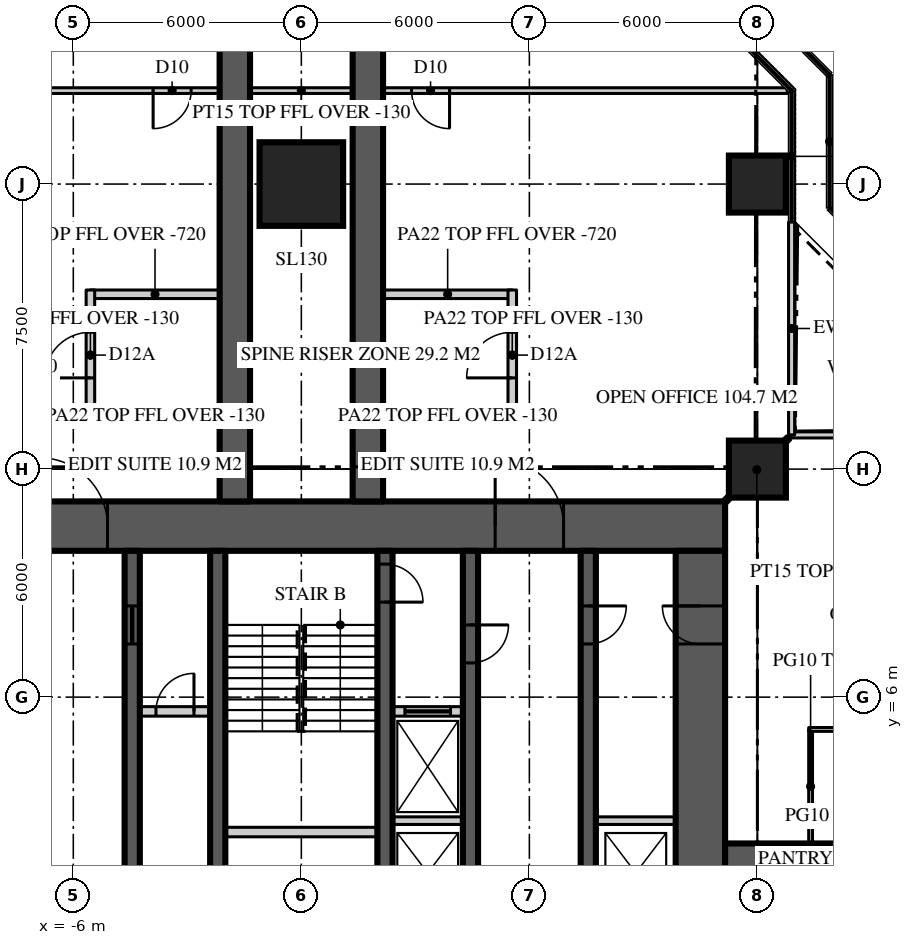
"""IFC4 building model, lengths in metres.
Left out: names, types, materials, properties, quantities, classifications, styles, units other than length and angle.
Written with IfcOpenShell. Run it as: python <this file> out.ifc"""

import sys

from ifc_helpers import new_model, si_unit, direction, frame, frame_2d, origin, origin_2d, place, context, subcontext, project, spatial, rectangle, extrude, element, fill, save


model = new_model("IFC4")
c1 = context("Model", 3, precision=1e-05, world=origin(), true_north=direction((0.0, 1.0)))
c2 = subcontext(c1, "Body", "Model", "MODEL_VIEW")
j1 = project(units=[si_unit("LENGTHUNIT", "METRE"), si_unit("PLANEANGLEUNIT", "RADIAN")], contexts=[c1])
p1 = place(None, origin())
s1 = spatial("IfcSite", under=j1, at=p1, CompositionType="ELEMENT")
p2 = place(p1, origin())
s2 = spatial("IfcBuilding", under=s1, at=p2, CompositionType="ELEMENT")
p3 = place(p2, frame((0.0, 0.0, 236.1)))
s3 = spatial("IfcBuildingStorey", under=s2, at=p3, CompositionType="ELEMENT", Elevation=236.1)
p4 = place(p3, frame((-11.15, 10.5, 0.0), z_axis=(0.0, 0.0, 1.0), x_axis=(1.0, 0.0, 0.0)))
e1 = element("IfcWall", 1, at=p4, inside=s3, PredefinedType="SHEAR", context=c2, shape_type="SweptSolid", body=[
    extrude(rectangle(XDim=22.3, YDim=1.3, at=frame_2d((11.15, 0.0))), origin(), (0.0, 0.0, 1.0), 3.9),
])
p5 = place(p4, frame((4.25, 0.0, 0.0)))
e2 = element("IfcOpeningElement", 2, at=p5, cuts=e1, PredefinedType="OPENING", context=c2, shape_type="SweptSolid", body=[
    extrude(rectangle(XDim=1.8, YDim=2.2, at=frame_2d((0.9, 1.1))), frame((0.0, 0.66, 0.0), z_axis=(0.0, -1.0, 0.0), x_axis=(1.0, 0.0, 0.0)), (0.0, 0.0, 1.0), 1.32),
])
p6 = place(p4, frame((16.25, 0.0, 0.0)))
e3 = element("IfcOpeningElement", 3, at=p6, cuts=e1, PredefinedType="OPENING", context=c2, shape_type="SweptSolid", body=[
    extrude(rectangle(XDim=1.8, YDim=2.2, at=frame_2d((0.9, 1.1))), frame((0.0, 0.66, 0.0), z_axis=(0.0, -1.0, 0.0), x_axis=(1.0, 0.0, 0.0)), (0.0, 0.0, 1.0), 1.32),
])
p7 = place(p3, frame((10.5, -9.85, 0.0), z_axis=(0.0, 0.0, 1.0), x_axis=(0.0, 1.0, 0.0)))
e4 = element("IfcWall", 4, at=p7, inside=s3, PredefinedType="SHEAR", context=c2, shape_type="SweptSolid", body=[
    extrude(rectangle(XDim=19.7, YDim=1.3, at=frame_2d((9.85, 0.0))), origin(), (0.0, 0.0, 1.0), 3.9),
])
p8 = place(p7, frame((17.25, 0.0, 0.0)))
e5 = element("IfcOpeningElement", 5, at=p8, cuts=e4, PredefinedType="OPENING", context=c2, shape_type="SweptSolid", body=[
    extrude(rectangle(XDim=1.0, YDim=2.2, at=frame_2d((0.5, 1.1))), frame((0.0, 0.66, 0.0), z_axis=(0.0, -1.0, 0.0), x_axis=(1.0, 0.0, 0.0)), (0.0, 0.0, 1.0), 1.32),
])
for number, where, z_axis, x_axis in (
    (6, (11.15, 1.75, 0.0), (0.0, 0.0, 1.0), (1.0, 0.0, 0.0)),
    (7, (1.75, 11.15, 0.0), (0.0, 0.0, 1.0), (0.0, 1.0, 0.0)),
    (8, (-1.75, 11.15, 0.0), (0.0, 0.0, 1.0), (0.0, 1.0, 0.0)),
):
    element("IfcWall", number, at=place(p3, frame(where, z_axis=z_axis, x_axis=x_axis)), inside=s3, PredefinedType="SHEAR", context=c2, shape_type="SweptSolid", body=[
        extrude(rectangle(XDim=15.25, YDim=0.8, at=frame_2d((7.625, 0.0))), origin(), (0.0, 0.0, 1.0), 3.9),
    ])
p9 = place(p3, frame((12.0, 12.0, 0.0), z_axis=(0.0, 0.0, 1.0), x_axis=(1.0, 0.0, 0.0)))
e9 = element("IfcColumn", 9, at=p9, inside=s3, PredefinedType="COLUMN", context=c2, shape_type="SweptSolid", body=[
    extrude(rectangle(XDim=1.5, YDim=1.5, at=origin_2d()), origin(), (0.0, 0.0, 1.0), 3.9),
])
p10 = place(p3, frame((0.0, 19.5, 0.0), z_axis=(0.0, 0.0, 1.0), x_axis=(1.0, 0.0, 0.0)))
e10 = element("IfcColumn", 10, at=p10, inside=s3, PredefinedType="COLUMN", context=c2, shape_type="SweptSolid", body=[
    extrude(rectangle(XDim=2.2, YDim=2.2, at=origin_2d()), origin(), (0.0, 0.0, 1.0), 3.9),
])
p11 = place(p3, frame((12.0, 19.5, 0.0), z_axis=(0.0, 0.0, 1.0), x_axis=(1.0, 0.0, 0.0)))
e11 = element("IfcColumn", 11, at=p11, inside=s3, PredefinedType="COLUMN", context=c2, shape_type="SweptSolid", body=[
    extrude(rectangle(XDim=1.5, YDim=1.5, at=origin_2d()), origin(), (0.0, 0.0, 1.0), 3.9),
])
p12 = place(p3, frame((18.5, 12.9, 0.0), z_axis=(0.0, 0.0, 1.0), x_axis=(-1.0, 0.0, 0.0)))
e12 = element("IfcWall", 12, at=p12, inside=s3, PredefinedType="SOLIDWALL", context=c2, shape_type="SweptSolid", body=[
    extrude(rectangle(XDim=5.6, YDim=0.16, at=frame_2d((2.8, 0.0))), origin(), (0.0, 0.0, 1.0), 3.77),
])
p13 = place(p12, frame((2.3, 0.0, 0.0)))
e13 = element("IfcOpeningElement", 13, at=p13, cuts=e12, PredefinedType="OPENING", context=c2, shape_type="SweptSolid", body=[
    extrude(rectangle(XDim=1.0, YDim=2.2, at=frame_2d((0.5, 1.1))), frame((0.0, 0.09, 0.0), z_axis=(0.0, -1.0, 0.0), x_axis=(1.0, 0.0, 0.0)), (0.0, 0.0, 1.0), 0.18),
])
p14 = place(p3, frame((12.9, 12.9, 0.0), z_axis=(0.0, 0.0, 1.0), x_axis=(0.0, 1.0, 0.0)))
e14 = element("IfcWall", 14, at=p14, inside=s3, PredefinedType="SOLIDWALL", context=c2, shape_type="SweptSolid", body=[
    extrude(rectangle(XDim=5.6, YDim=0.16, at=frame_2d((2.8, 0.0))), origin(), (0.0, 0.0, 1.0), 3.77),
])
p15 = place(p3, frame((7.55, 9.85, 0.0), z_axis=(0.0, 0.0, 1.0), x_axis=(0.0, -1.0, 0.0)))
e15 = element("IfcWall", 15, at=p15, inside=s3, PredefinedType="SHEAR", context=c2, shape_type="SweptSolid", body=[
    extrude(rectangle(XDim=19.7, YDim=0.4, at=frame_2d((9.85, 0.0))), origin(), (0.0, 0.0, 1.0), 3.9),
])
p16 = place(p15, frame((1.45, 0.0, 0.0)))
e16 = element("IfcOpeningElement", 16, at=p16, cuts=e15, PredefinedType="OPENING", context=c2, shape_type="SweptSolid", body=[
    extrude(rectangle(XDim=1.0, YDim=2.2, at=frame_2d((0.5, 1.1))), frame((0.0, 0.21, 0.0), z_axis=(0.0, -1.0, 0.0), x_axis=(1.0, 0.0, 0.0)), (0.0, 0.0, 1.0), 0.42),
])
p17 = place(p15, frame((17.3, 0.0, 0.0)))
e17 = element("IfcOpeningElement", 17, at=p17, cuts=e15, PredefinedType="OPENING", context=c2, shape_type="SweptSolid", body=[
    extrude(rectangle(XDim=0.9, YDim=2.1, at=frame_2d((0.45, 1.05))), frame((0.0, 0.21, 0.0), z_axis=(0.0, -1.0, 0.0), x_axis=(1.0, 0.0, 0.0)), (0.0, 0.0, 1.0), 0.42),
])
p18 = place(p3, frame((-4.45, -9.85, 0.0), z_axis=(0.0, 0.0, 1.0), x_axis=(0.0, 1.0, 0.0)))
e18 = element("IfcWall", 18, at=p18, inside=s3, PredefinedType="SHEAR", context=c2, shape_type="SweptSolid", body=[
    extrude(rectangle(XDim=19.7, YDim=0.4, at=frame_2d((9.85, 0.0))), origin(), (0.0, 0.0, 1.0), 3.9),
])
p19 = place(p18, frame((1.95, 0.0, 0.0)))
e19 = element("IfcOpeningElement", 19, at=p19, cuts=e18, PredefinedType="OPENING", context=c2, shape_type="SweptSolid", body=[
    extrude(rectangle(XDim=1.0, YDim=2.2, at=frame_2d((0.5, 1.1))), frame((0.0, 0.21, 0.0), z_axis=(0.0, -1.0, 0.0), x_axis=(1.0, 0.0, 0.0)), (0.0, 0.0, 1.0), 0.42),
])
p20 = place(p18, frame((17.25, 0.0, 0.0)))
e20 = element("IfcOpeningElement", 20, at=p20, cuts=e18, PredefinedType="OPENING", context=c2, shape_type="SweptSolid", body=[
    extrude(rectangle(XDim=1.0, YDim=2.1, at=frame_2d((0.5, 1.05))), frame((0.0, 0.21, 0.0), z_axis=(0.0, -1.0, 0.0), x_axis=(1.0, 0.0, 0.0)), (0.0, 0.0, 1.0), 0.42),
])
p21 = place(p3, frame((4.45, 9.85, 0.0), z_axis=(0.0, 0.0, 1.0), x_axis=(0.0, -1.0, 0.0)))
e21 = element("IfcWall", 21, at=p21, inside=s3, PredefinedType="SHEAR", context=c2, shape_type="SweptSolid", body=[
    extrude(rectangle(XDim=19.7, YDim=0.4, at=frame_2d((9.85, 0.0))), origin(), (0.0, 0.0, 1.0), 3.9),
])
p22 = place(p21, frame((1.95, 0.0, 0.0)))
e22 = element("IfcOpeningElement", 22, at=p22, cuts=e21, PredefinedType="OPENING", context=c2, shape_type="SweptSolid", body=[
    extrude(rectangle(XDim=1.0, YDim=2.2, at=frame_2d((0.5, 1.1))), frame((0.0, 0.21, 0.0), z_axis=(0.0, -1.0, 0.0), x_axis=(1.0, 0.0, 0.0)), (0.0, 0.0, 1.0), 0.42),
])
p23 = place(p21, frame((17.3, 0.0, 0.0)))
e23 = element("IfcOpeningElement", 23, at=p23, cuts=e21, PredefinedType="OPENING", context=c2, shape_type="SweptSolid", body=[
    extrude(rectangle(XDim=0.9, YDim=2.1, at=frame_2d((0.45, 1.05))), frame((0.0, 0.21, 0.0), z_axis=(0.0, -1.0, 0.0), x_axis=(1.0, 0.0, 0.0)), (0.0, 0.0, 1.0), 0.42),
])
p24 = place(p3, frame((-2.2, -9.85, 0.0), z_axis=(0.0, 0.0, 1.0), x_axis=(0.0, 1.0, 0.0)))
e24 = element("IfcWall", 24, at=p24, inside=s3, PredefinedType="SHEAR", context=c2, shape_type="SweptSolid", body=[
    extrude(rectangle(XDim=19.7, YDim=0.4, at=frame_2d((9.85, 0.0))), origin(), (0.0, 0.0, 1.0), 3.9),
])
p25 = place(p24, frame((0.35, 0.0, 0.0)))
e25 = element("IfcOpeningElement", 25, at=p25, cuts=e24, PredefinedType="OPENING", context=c2, shape_type="SweptSolid", body=[
    extrude(rectangle(XDim=1.0, YDim=2.2, at=frame_2d((0.5, 1.1))), frame((0.0, 0.21, 0.0), z_axis=(0.0, -1.0, 0.0), x_axis=(1.0, 0.0, 0.0)), (0.0, 0.0, 1.0), 0.42),
])
p26 = place(p3, frame((2.2, 9.85, 0.0), z_axis=(0.0, 0.0, 1.0), x_axis=(0.0, -1.0, 0.0)))
e26 = element("IfcWall", 26, at=p26, inside=s3, PredefinedType="SHEAR", context=c2, shape_type="SweptSolid", body=[
    extrude(rectangle(XDim=19.7, YDim=0.4, at=frame_2d((9.85, 0.0))), origin(), (0.0, 0.0, 1.0), 3.9),
])
p27 = place(p26, frame((0.35, 0.0, 0.0)))
e27 = element("IfcOpeningElement", 27, at=p27, cuts=e26, PredefinedType="OPENING", context=c2, shape_type="SweptSolid", body=[
    extrude(rectangle(XDim=1.0, YDim=2.2, at=frame_2d((0.5, 1.1))), frame((0.0, 0.21, 0.0), z_axis=(0.0, -1.0, 0.0), x_axis=(1.0, 0.0, 0.0)), (0.0, 0.0, 1.0), 0.42),
])
p28 = place(p3, frame((-4.25, 5.625, 0.0), z_axis=(0.0, 0.0, 1.0), x_axis=(1.0, 0.0, 0.0)))
e28 = element("IfcWall", 28, at=p28, inside=s3, PredefinedType="SOLIDWALL", context=c2, shape_type="SweptSolid", body=[
    extrude(rectangle(XDim=1.85, YDim=0.25, at=frame_2d((0.925, 0.0))), origin(), (0.0, 0.0, 1.0), 3.7),
])
p29 = place(p28, frame((0.425, 0.0, 0.0)))
e29 = element("IfcOpeningElement", 29, at=p29, cuts=e28, PredefinedType="OPENING", context=c2, shape_type="SweptSolid", body=[
    extrude(rectangle(XDim=1.0, YDim=2.2, at=frame_2d((0.5, 1.1))), frame((0.0, 0.135, 0.0), z_axis=(0.0, -1.0, 0.0), x_axis=(1.0, 0.0, 0.0)), (0.0, 0.0, 1.0), 0.27),
])
p30 = place(p3, frame((2.4, 5.625, 0.0), z_axis=(0.0, 0.0, 1.0), x_axis=(1.0, 0.0, 0.0)))
e30 = element("IfcWall", 30, at=p30, inside=s3, PredefinedType="SOLIDWALL", context=c2, shape_type="SweptSolid", body=[
    extrude(rectangle(XDim=1.85, YDim=0.25, at=frame_2d((0.925, 0.0))), origin(), (0.0, 0.0, 1.0), 3.7),
])
p31 = place(p30, frame((0.325, 0.0, 0.0)))
e31 = element("IfcOpeningElement", 31, at=p31, cuts=e30, PredefinedType="OPENING", context=c2, shape_type="SweptSolid", body=[
    extrude(rectangle(XDim=1.2, YDim=2.2, at=frame_2d((0.6, 1.1))), frame((0.0, 0.135, 0.0), z_axis=(0.0, -1.0, 0.0), x_axis=(1.0, 0.0, 0.0)), (0.0, 0.0, 1.0), 0.27),
])
p32 = place(p3, frame((-2.0, 2.45, 0.0), z_axis=(0.0, 0.0, 1.0), x_axis=(1.0, 0.0, 0.0)))
e32 = element("IfcWall", 32, at=p32, inside=s3, PredefinedType="SOLIDWALL", context=c2, shape_type="SweptSolid", body=[
    extrude(rectangle(XDim=4.0, YDim=0.25, at=frame_2d((2.0, 0.0))), origin(), (0.0, 0.0, 1.0), 3.7),
])
p33 = place(p3, frame((2.4, 2.75, 0.0), z_axis=(0.0, 0.0, 1.0), x_axis=(1.0, 0.0, 0.0)))
e33 = element("IfcWall", 33, at=p33, inside=s3, PredefinedType="SOLIDWALL", context=c2, shape_type="SweptSolid", body=[
    extrude(rectangle(XDim=1.85, YDim=0.2, at=frame_2d((0.925, 0.0))), origin(), (0.0, 0.0, 1.0), 3.7),
])
p34 = place(p3, frame((7.75, 2.75, 0.0), z_axis=(0.0, 0.0, 1.0), x_axis=(1.0, 0.0, 0.0)))
e34 = element("IfcWall", 34, at=p34, inside=s3, PredefinedType="SOLIDWALL", context=c2, shape_type="SweptSolid", body=[
    extrude(rectangle(XDim=2.1, YDim=0.2, at=frame_2d((1.05, 0.0))), origin(), (0.0, 0.0, 1.0), 3.7),
])
p35 = place(p3, frame((13.4, 2.15, 0.0), z_axis=(0.0, 0.0, 1.0), x_axis=(0.0, 1.0, 0.0)))
e35 = element("IfcWall", 35, at=p35, inside=s3, PredefinedType="PARTITIONING", context=c2, shape_type="SweptSolid", body=[
    extrude(rectangle(XDim=3.0, YDim=0.1, at=frame_2d((1.5, 0.0))), origin(), (0.0, 0.0, 1.0), 3.77),
])
p36 = place(p3, frame((13.35, 5.15, 0.0), z_axis=(0.0, 0.0, 1.0), x_axis=(1.0, 0.0, 0.0)))
e36 = element("IfcWall", 36, at=p36, inside=s3, PredefinedType="PARTITIONING", context=c2, shape_type="SweptSolid", body=[
    extrude(rectangle(XDim=3.1, YDim=0.1, at=frame_2d((1.55, 0.0))), origin(), (0.0, 0.0, 1.0), 3.77),
])
p37 = place(p36, frame((1.05, 0.0, 0.0)))
e37 = element("IfcOpeningElement", 37, at=p37, cuts=e36, PredefinedType="OPENING", context=c2, shape_type="SweptSolid", body=[
    extrude(rectangle(XDim=1.0, YDim=2.2, at=frame_2d((0.5, 1.1))), frame((0.0, 0.06, 0.0), z_axis=(0.0, -1.0, 0.0), x_axis=(1.0, 0.0, 0.0)), (0.0, 0.0, 1.0), 0.12),
])
p38 = place(p3, frame((12.786, 21.959, 0.0), z_axis=(0.0, 0.0, 1.0), x_axis=(-1.0, 0.0, 0.0)))
e38 = element("IfcWall", 38, at=p38, inside=s3, PredefinedType="PARTITIONING", context=c2, shape_type="SweptSolid", body=[
    extrude(rectangle(XDim=25.573, YDim=0.15, at=frame_2d((12.786, 0.0))), origin(), (0.0, 0.0, 1.0), 3.77),
])
p39 = place(p38, frame((15.687, 0.0, 0.0)))
e39 = element("IfcOpeningElement", 39, at=p39, cuts=e38, PredefinedType="OPENING", context=c2, shape_type="SweptSolid", body=[
    extrude(rectangle(XDim=1.0, YDim=2.2, at=frame_2d((0.5, 1.1))), frame((0.0, 0.085, 0.0), z_axis=(0.0, -1.0, 0.0), x_axis=(1.0, 0.0, 0.0)), (0.0, 0.0, 1.0), 0.17),
])
p40 = place(p38, frame((8.886, 0.0, 0.0)))
e40 = element("IfcOpeningElement", 40, at=p40, cuts=e38, PredefinedType="OPENING", context=c2, shape_type="SweptSolid", body=[
    extrude(rectangle(XDim=1.0, YDim=2.2, at=frame_2d((0.5, 1.1))), frame((0.0, 0.085, 0.0), z_axis=(0.0, -1.0, 0.0), x_axis=(1.0, 0.0, 0.0)), (0.0, 0.0, 1.0), 0.17),
])
p41 = place(p3, frame((-2.15, 13.4, 0.0), z_axis=(0.0, 0.0, 1.0), x_axis=(-1.0, 0.0, 0.0)))
e41 = element("IfcWall", 41, at=p41, inside=s3, PredefinedType="PARTITIONING", context=c2, shape_type="SweptSolid", body=[
    extrude(rectangle(XDim=3.4, YDim=0.225, at=frame_2d((1.7, 0.0))), origin(), (0.0, 0.0, 1.0), 3.77),
])
p42 = place(p3, frame((-2.15, 16.6, 0.0), z_axis=(0.0, 0.0, 1.0), x_axis=(-1.0, 0.0, 0.0)))
e42 = element("IfcWall", 42, at=p42, inside=s3, PredefinedType="PARTITIONING", context=c2, shape_type="SweptSolid", body=[
    extrude(rectangle(XDim=3.4, YDim=0.225, at=frame_2d((1.7, 0.0))), origin(), (0.0, 0.0, 1.0), 3.18),
])
p43 = place(p3, frame((-5.55, 13.288, 0.0), z_axis=(0.0, 0.0, 1.0), x_axis=(0.0, 1.0, 0.0)))
e43 = element("IfcWall", 43, at=p43, inside=s3, PredefinedType="PARTITIONING", context=c2, shape_type="SweptSolid", body=[
    extrude(rectangle(XDim=3.425, YDim=0.225, at=frame_2d((1.712, 0.0))), origin(), (0.0, 0.0, 1.0), 3.77),
])
p44 = place(p43, frame((1.113, 0.0, 0.0)))
e44 = element("IfcOpeningElement", 44, at=p44, cuts=e43, PredefinedType="OPENING", context=c2, shape_type="SweptSolid", body=[
    extrude(rectangle(XDim=1.2, YDim=2.2, at=frame_2d((0.6, 1.1))), frame((0.0, 0.123, 0.0), z_axis=(0.0, -1.0, 0.0), x_axis=(1.0, 0.0, 0.0)), (0.0, 0.0, 1.0), 0.245),
])
p45 = place(p3, frame((2.15, 13.4, 0.0), z_axis=(0.0, 0.0, 1.0), x_axis=(1.0, 0.0, 0.0)))
e45 = element("IfcWall", 45, at=p45, inside=s3, PredefinedType="PARTITIONING", context=c2, shape_type="SweptSolid", body=[
    extrude(rectangle(XDim=3.4, YDim=0.225, at=frame_2d((1.7, 0.0))), origin(), (0.0, 0.0, 1.0), 3.77),
])
p46 = place(p3, frame((2.15, 16.6, 0.0), z_axis=(0.0, 0.0, 1.0), x_axis=(1.0, 0.0, 0.0)))
e46 = element("IfcWall", 46, at=p46, inside=s3, PredefinedType="PARTITIONING", context=c2, shape_type="SweptSolid", body=[
    extrude(rectangle(XDim=3.4, YDim=0.225, at=frame_2d((1.7, 0.0))), origin(), (0.0, 0.0, 1.0), 3.18),
])
p47 = place(p3, frame((5.55, 13.288, 0.0), z_axis=(0.0, 0.0, 1.0), x_axis=(0.0, 1.0, 0.0)))
e47 = element("IfcWall", 47, at=p47, inside=s3, PredefinedType="PARTITIONING", context=c2, shape_type="SweptSolid", body=[
    extrude(rectangle(XDim=3.425, YDim=0.225, at=frame_2d((1.712, 0.0))), origin(), (0.0, 0.0, 1.0), 3.77),
])
p48 = place(p47, frame((1.113, 0.0, 0.0)))
e48 = element("IfcOpeningElement", 48, at=p48, cuts=e47, PredefinedType="OPENING", context=c2, shape_type="SweptSolid", body=[
    extrude(rectangle(XDim=1.2, YDim=2.2, at=frame_2d((0.6, 1.1))), frame((0.0, 0.123, 0.0), z_axis=(0.0, -1.0, 0.0), x_axis=(1.0, 0.0, 0.0)), (0.0, 0.0, 1.0), 0.245),
])
p49 = place(p3, frame((11.15, 11.15, 0.0), z_axis=(0.0, 0.0, 1.0), x_axis=(0.707106781187, 0.707106781187, 0.0)))
e49 = element("IfcWall", 49, at=p49, inside=s3, PredefinedType="PARTITIONING", context=c2, shape_type="SweptSolid", body=[
    extrude(rectangle(XDim=2.362, YDim=0.15, at=frame_2d((1.181, 0.0))), origin(), (0.0, 0.0, 1.0), 3.22),
])
p50 = place(p5, origin())
e50 = element("IfcDoor", 50, at=p50, inside=s3, OperationType="DOUBLE_DOOR_DOUBLE_SWING", PredefinedType="DOOR", context=c2, shape_type="SweptSolid", body=[
    extrude(rectangle(XDim=1.8, YDim=2.2, at=frame_2d((0.9, 1.1))), frame((0.0, 0.025, 0.0), z_axis=(0.0, -1.0, 0.0), x_axis=(1.0, 0.0, 0.0)), (0.0, 0.0, 1.0), 0.05),
])
fill(e2, e50)
p51 = place(p6, origin())
e51 = element("IfcDoor", 51, at=p51, inside=s3, OperationType="DOUBLE_DOOR_DOUBLE_SWING", PredefinedType="DOOR", context=c2, shape_type="SweptSolid", body=[
    extrude(rectangle(XDim=1.8, YDim=2.2, at=frame_2d((0.9, 1.1))), frame((0.0, 0.025, 0.0), z_axis=(0.0, -1.0, 0.0), x_axis=(1.0, 0.0, 0.0)), (0.0, 0.0, 1.0), 0.05),
])
fill(e3, e51)
p52 = place(p16, origin())
e52 = element("IfcDoor", 52, at=p52, inside=s3, OperationType="SINGLE_SWING_LEFT", PredefinedType="DOOR", context=c2, shape_type="SweptSolid", body=[
    extrude(rectangle(XDim=1.0, YDim=2.2, at=frame_2d((0.5, 1.1))), frame((0.0, 0.025, 0.0), z_axis=(0.0, -1.0, 0.0), x_axis=(1.0, 0.0, 0.0)), (0.0, 0.0, 1.0), 0.05),
])
fill(e16, e52)
p53 = place(p8, origin())
e53 = element("IfcDoor", 53, at=p53, inside=s3, OperationType="SINGLE_SWING_RIGHT", PredefinedType="DOOR", context=c2, shape_type="SweptSolid", body=[
    extrude(rectangle(XDim=1.0, YDim=2.2, at=frame_2d((0.5, 1.1))), frame((0.0, 0.025, 0.0), z_axis=(0.0, -1.0, 0.0), x_axis=(1.0, 0.0, 0.0)), (0.0, 0.0, 1.0), 0.05),
])
fill(e5, e53)
p54 = place(p22, origin())
e54 = element("IfcDoor", 54, at=p54, inside=s3, OperationType="SINGLE_SWING_LEFT", PredefinedType="DOOR", context=c2, shape_type="SweptSolid", body=[
    extrude(rectangle(XDim=1.0, YDim=2.2, at=frame_2d((0.5, 1.1))), frame((0.0, 0.025, 0.0), z_axis=(0.0, -1.0, 0.0), x_axis=(1.0, 0.0, 0.0)), (0.0, 0.0, 1.0), 0.05),
])
fill(e22, e54)
p55 = place(p27, origin())
e55 = element("IfcDoor", 55, at=p55, inside=s3, OperationType="SINGLE_SWING_RIGHT", PredefinedType="DOOR", context=c2, shape_type="SweptSolid", body=[
    extrude(rectangle(XDim=1.0, YDim=2.2, at=frame_2d((0.5, 1.1))), frame((0.0, 0.025, 0.0), z_axis=(0.0, -1.0, 0.0), x_axis=(1.0, 0.0, 0.0)), (0.0, 0.0, 1.0), 0.05),
])
fill(e27, e55)
p56 = place(p20, origin())
e56 = element("IfcDoor", 56, at=p56, inside=s3, OperationType="SLIDING_TO_LEFT", PredefinedType="DOOR", context=c2, shape_type="SweptSolid", body=[
    extrude(rectangle(XDim=1.0, YDim=2.1, at=frame_2d((0.5, 1.05))), frame((0.0, 0.025, 0.0), z_axis=(0.0, -1.0, 0.0), x_axis=(1.0, 0.0, 0.0)), (0.0, 0.0, 1.0), 0.05),
])
fill(e20, e56)
p57 = place(p31, origin())
e57 = element("IfcDoor", 57, at=p57, inside=s3, OperationType="SLIDING_TO_LEFT", PredefinedType="DOOR", context=c2, shape_type="SweptSolid", body=[
    extrude(rectangle(XDim=1.2, YDim=2.2, at=frame_2d((0.6, 1.1))), frame((0.0, 0.025, 0.0), z_axis=(0.0, -1.0, 0.0), x_axis=(1.0, 0.0, 0.0)), (0.0, 0.0, 1.0), 0.05),
])
fill(e31, e57)
p58 = place(p39, origin())
e58 = element("IfcDoor", 58, at=p58, inside=s3, OperationType="SINGLE_SWING_RIGHT", PredefinedType="DOOR", context=c2, shape_type="SweptSolid", body=[
    extrude(rectangle(XDim=1.0, YDim=2.2, at=frame_2d((0.5, 1.1))), frame((0.0, 0.025, 0.0), z_axis=(0.0, -1.0, 0.0), x_axis=(1.0, 0.0, 0.0)), (0.0, 0.0, 1.0), 0.05),
])
fill(e39, e58)
p59 = place(p40, origin())
e59 = element("IfcDoor", 59, at=p59, inside=s3, OperationType="SINGLE_SWING_LEFT", PredefinedType="DOOR", context=c2, shape_type="SweptSolid", body=[
    extrude(rectangle(XDim=1.0, YDim=2.2, at=frame_2d((0.5, 1.1))), frame((0.0, 0.025, 0.0), z_axis=(0.0, -1.0, 0.0), x_axis=(1.0, 0.0, 0.0)), (0.0, 0.0, 1.0), 0.05),
])
fill(e40, e59)
p60 = place(p44, origin())
e60 = element("IfcDoor", 60, at=p60, inside=s3, OperationType="SINGLE_SWING_LEFT", PredefinedType="DOOR", context=c2, shape_type="SweptSolid", body=[
    extrude(rectangle(XDim=1.2, YDim=2.2, at=frame_2d((0.6, 1.1))), frame((0.0, 0.025, 0.0), z_axis=(0.0, -1.0, 0.0), x_axis=(1.0, 0.0, 0.0)), (0.0, 0.0, 1.0), 0.05),
])
fill(e44, e60)
p61 = place(p48, origin())
e61 = element("IfcDoor", 61, at=p61, inside=s3, OperationType="SINGLE_SWING_LEFT", PredefinedType="DOOR", context=c2, shape_type="SweptSolid", body=[
    extrude(rectangle(XDim=1.2, YDim=2.2, at=frame_2d((0.6, 1.1))), frame((0.0, 0.025, 0.0), z_axis=(0.0, -1.0, 0.0), x_axis=(1.0, 0.0, 0.0)), (0.0, 0.0, 1.0), 0.05),
])
fill(e48, e61)
p62 = place(p29, origin())
e62 = element("IfcDoor", 62, at=p62, inside=s3, OperationType="SINGLE_SWING_RIGHT", PredefinedType="DOOR", context=c2, shape_type="SweptSolid", body=[
    extrude(rectangle(XDim=1.0, YDim=2.2, at=frame_2d((0.5, 1.1))), frame((0.0, 0.025, 0.0), z_axis=(0.0, -1.0, 0.0), x_axis=(1.0, 0.0, 0.0)), (0.0, 0.0, 1.0), 0.05),
])
fill(e29, e62)
save(model, sys.argv[1])
